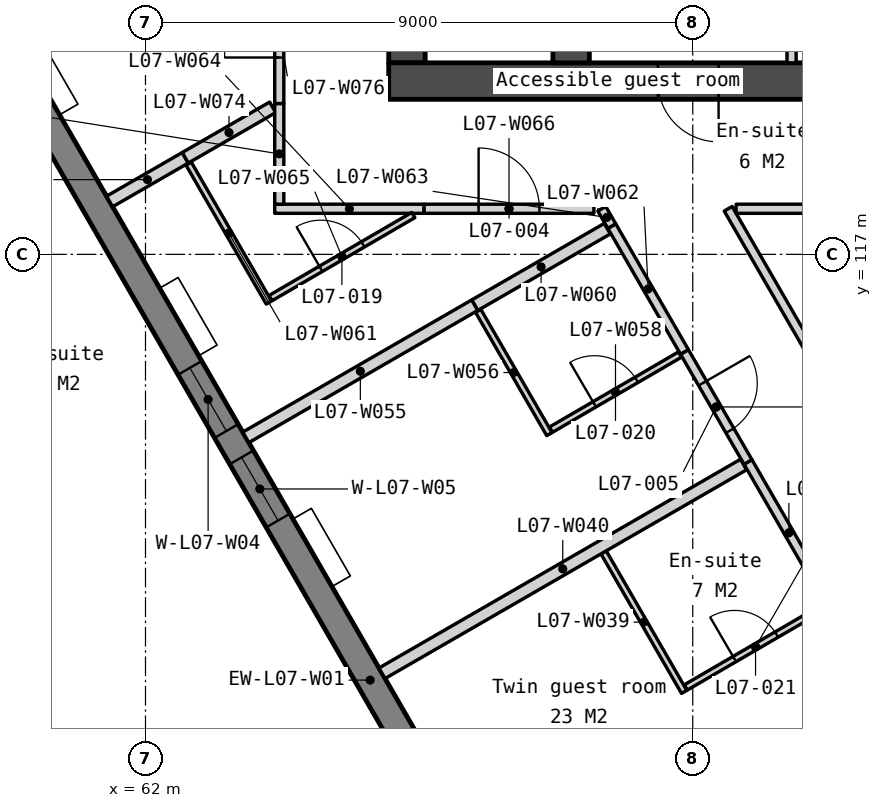
"""IFC4 building model, lengths in metres.
Left out: names, types, materials, properties, quantities, classifications, styles, units other than length and angle.
Written with IfcOpenShell. Run it as: python <this file> out.ifc"""

import sys

from ifc_helpers import new_model, si_unit, direction, frame, frame_2d, origin, place, context, subcontext, project, spatial, polyline, rectangle, outline, extrude, element, fill, save


model = new_model("IFC4")
c1 = context("Model", 3, precision=1e-05, world=origin(), true_north=direction((0.0, 1.0)))
c2 = subcontext(c1, "Body", "Model", "MODEL_VIEW")
j1 = project(units=[si_unit("LENGTHUNIT", "METRE"), si_unit("PLANEANGLEUNIT", "RADIAN")], contexts=[c1])
p1 = place(None, origin())
s1 = spatial("IfcSite", under=j1, at=p1, CompositionType="ELEMENT")
p2 = place(p1, origin())
s2 = spatial("IfcBuilding", under=s1, at=p2, CompositionType="ELEMENT")
p3 = place(p2, frame((0.0, 0.0, 38.5)))
s3 = spatial("IfcBuildingStorey", under=s2, at=p3, CompositionType="ELEMENT", Elevation=38.5)
p4 = place(p3, frame((66.3, 133.95, 0.0), z_axis=(0.0, 0.0, 1.0), x_axis=(0.0, -1.0, 0.0)))
e1 = element("IfcWall", 1, at=p4, inside=s3, PredefinedType="SOLIDWALL", context=c2, shape_type="SweptSolid", body=[
    extrude(rectangle(XDim=13.8, YDim=0.6, at=frame_2d((6.9, 0.0))), origin(), (0.0, 0.0, 1.0), 3.35),
])
p5 = place(p4, frame((0.6, 0.0, 0.0)))
e2 = element("IfcOpeningElement", 2, at=p5, cuts=e1, PredefinedType="OPENING", context=c2, shape_type="SweptSolid", body=[
    extrude(rectangle(XDim=1.1, YDim=2.1, at=frame_2d((0.55, 1.05))), frame((0.0, 0.31, 0.0), z_axis=(0.0, -1.0, 0.0), x_axis=(1.0, 0.0, 0.0)), (0.0, 0.0, 1.0), 0.62),
])
p6 = place(p4, frame((8.963, 0.0, 0.0)))
e3 = element("IfcOpeningElement", 3, at=p6, cuts=e1, PredefinedType="OPENING", context=c2, shape_type="SweptSolid", body=[
    extrude(rectangle(XDim=1.0, YDim=2.1, at=frame_2d((0.5, 1.05))), frame((0.0, 0.31, 0.0), z_axis=(0.0, -1.0, 0.0), x_axis=(1.0, 0.0, 0.0)), (0.0, 0.0, 1.0), 0.62),
])
p7 = place(p4, frame((11.888, 0.0, 0.0)))
e4 = element("IfcOpeningElement", 4, at=p7, cuts=e1, PredefinedType="OPENING", context=c2, shape_type="SweptSolid", body=[
    extrude(rectangle(XDim=1.0, YDim=2.1, at=frame_2d((0.5, 1.05))), frame((0.0, 0.31, 0.0), z_axis=(0.0, -1.0, 0.0), x_axis=(1.0, 0.0, 0.0)), (0.0, 0.0, 1.0), 0.62),
])
p8 = place(p3, frame((66.0, 119.85, 0.0), z_axis=(0.0, 0.0, 1.0), x_axis=(1.0, 0.0, 0.0)))
e5 = element("IfcWall", 5, at=p8, inside=s3, PredefinedType="SOLIDWALL", context=c2, shape_type="SweptSolid", body=[
    extrude(rectangle(XDim=28.0, YDim=0.6, at=frame_2d((14.0, 0.0))), origin(), (0.0, 0.0, 1.0), 3.35),
])
p9 = place(p8, frame((6.825, 0.0, 0.0)))
e6 = element("IfcOpeningElement", 6, at=p9, cuts=e5, PredefinedType="OPENING", context=c2, shape_type="SweptSolid", body=[
    extrude(rectangle(XDim=1.8, YDim=2.1, at=frame_2d((0.9, 1.05))), frame((0.0, 0.31, 0.0), z_axis=(0.0, -1.0, 0.0), x_axis=(1.0, 0.0, 0.0)), (0.0, 0.0, 1.0), 0.62),
])
p10 = place(p8, frame((15.85, 0.0, 0.0)))
e7 = element("IfcOpeningElement", 7, at=p10, cuts=e5, PredefinedType="OPENING", context=c2, shape_type="SweptSolid", body=[
    extrude(rectangle(XDim=1.5, YDim=2.1, at=frame_2d((0.75, 1.05))), frame((0.0, 0.31, 0.0), z_axis=(0.0, -1.0, 0.0), x_axis=(1.0, 0.0, 0.0)), (0.0, 0.0, 1.0), 0.62),
])
p11 = place(p8, frame((19.375, 0.0, 0.0)))
e8 = element("IfcOpeningElement", 8, at=p11, cuts=e5, PredefinedType="OPENING", context=c2, shape_type="SweptSolid", body=[
    extrude(rectangle(XDim=1.8, YDim=2.1, at=frame_2d((0.9, 1.05))), frame((0.0, 0.31, 0.0), z_axis=(0.0, -1.0, 0.0), x_axis=(1.0, 0.0, 0.0)), (0.0, 0.0, 1.0), 0.62),
])
p12 = place(p8, frame((4.425, 0.0, 0.0)))
e9 = element("IfcOpeningElement", 9, at=p12, cuts=e5, PredefinedType="OPENING", context=c2, shape_type="SweptSolid", body=[
    extrude(rectangle(XDim=1.0, YDim=2.1, at=frame_2d((0.5, 1.05))), frame((0.0, 0.31, 0.0), z_axis=(0.0, -1.0, 0.0), x_axis=(1.0, 0.0, 0.0)), (0.0, 0.0, 1.0), 0.62),
])
p13 = place(p8, frame((9.783, 0.0, 0.0)))
e10 = element("IfcOpeningElement", 10, at=p13, cuts=e5, PredefinedType="OPENING", context=c2, shape_type="SweptSolid", body=[
    extrude(rectangle(XDim=1.0, YDim=2.1, at=frame_2d((0.5, 1.05))), frame((0.0, 0.31, 0.0), z_axis=(0.0, -1.0, 0.0), x_axis=(1.0, 0.0, 0.0)), (0.0, 0.0, 1.0), 0.62),
])
p14 = place(p8, frame((11.525, 0.0, 0.0)))
e11 = element("IfcOpeningElement", 11, at=p14, cuts=e5, PredefinedType="OPENING", context=c2, shape_type="SweptSolid", body=[
    extrude(rectangle(XDim=1.0, YDim=2.1, at=frame_2d((0.5, 1.05))), frame((0.0, 0.31, 0.0), z_axis=(0.0, -1.0, 0.0), x_axis=(1.0, 0.0, 0.0)), (0.0, 0.0, 1.0), 0.62),
])
p15 = place(p8, frame((13.658, 0.0, 0.0)))
e12 = element("IfcOpeningElement", 12, at=p15, cuts=e5, PredefinedType="OPENING", context=c2, shape_type="SweptSolid", body=[
    extrude(rectangle(XDim=1.0, YDim=2.1, at=frame_2d((0.5, 1.05))), frame((0.0, 0.31, 0.0), z_axis=(0.0, -1.0, 0.0), x_axis=(1.0, 0.0, 0.0)), (0.0, 0.0, 1.0), 0.62),
])
p16 = place(p8, frame((22.575, 0.0, 0.0)))
e13 = element("IfcOpeningElement", 13, at=p16, cuts=e5, PredefinedType="OPENING", context=c2, shape_type="SweptSolid", body=[
    extrude(rectangle(XDim=1.0, YDim=2.1, at=frame_2d((0.5, 1.05))), frame((0.0, 0.31, 0.0), z_axis=(0.0, -1.0, 0.0), x_axis=(1.0, 0.0, 0.0)), (0.0, 0.0, 1.0), 0.62),
])
p17 = place(p3, frame((69.0, 122.25, 0.0), z_axis=(0.0, 0.0, 1.0), x_axis=(0.0, -1.0, 0.0)))
e14 = element("IfcWall", 14, at=p17, inside=s3, PredefinedType="SOLIDWALL", context=c2, shape_type="SweptSolid", body=[
    extrude(rectangle(XDim=2.1, YDim=0.6, at=frame_2d((1.05, 0.0))), origin(), (0.0, 0.0, 1.0), 3.35),
])
p18 = place(p3, frame((72.625, 122.25, 0.0), z_axis=(0.0, 0.0, 1.0), x_axis=(0.0, -1.0, 0.0)))
e15 = element("IfcWall", 15, at=p18, inside=s3, PredefinedType="PARTITIONING", context=c2, shape_type="SweptSolid", body=[
    extrude(rectangle(XDim=2.1, YDim=0.15, at=frame_2d((1.05, 0.0))), origin(), (0.0, 0.0, 1.0), 3.35),
])
p19 = place(p3, frame((54.495, 129.397, -0.15), z_axis=(0.0, 0.0, 1.0), x_axis=(0.499999201451, -0.866025864826, 0.0)))
e16 = element("IfcWall", 16, at=p19, inside=s3, PredefinedType="SOLIDWALL", context=c2, shape_type="SweptSolid", body=[
    extrude(outline(polyline([(44.8, 0.0), (44.8, 3.5), (0.0, 3.5), (0.0, 0.0), (44.8, 0.0)])), frame((0.0, 0.225, 0.0), z_axis=(0.0, -1.0, 0.0), x_axis=(1.0, 0.0, 0.0)), (0.0, 0.0, 1.0), 0.45),
])
p20 = place(p19, frame((0.722, 0.0, 1.05)))
e17 = element("IfcOpeningElement", 17, at=p20, cuts=e16, PredefinedType="OPENING", context=c2, shape_type="SweptSolid", body=[
    extrude(rectangle(XDim=1.2, YDim=1.5, at=frame_2d((0.6, 0.75))), frame((0.0, 0.235, 0.0), z_axis=(0.0, -1.0, 0.0), x_axis=(1.0, 0.0, 0.0)), (0.0, 0.0, 1.0), 0.47),
])
p21 = place(p19, frame((7.51, 0.0, 1.05)))
e18 = element("IfcOpeningElement", 18, at=p21, cuts=e16, PredefinedType="OPENING", context=c2, shape_type="SweptSolid", body=[
    extrude(rectangle(XDim=1.2, YDim=1.5, at=frame_2d((0.6, 0.75))), frame((0.0, 0.235, 0.0), z_axis=(0.0, -1.0, 0.0), x_axis=(1.0, 0.0, 0.0)), (0.0, 0.0, 1.0), 0.47),
])
p22 = place(p19, frame((9.21, 0.0, 1.05)))
e19 = element("IfcOpeningElement", 19, at=p22, cuts=e16, PredefinedType="OPENING", context=c2, shape_type="SweptSolid", body=[
    extrude(rectangle(XDim=1.2, YDim=1.5, at=frame_2d((0.6, 0.75))), frame((0.0, 0.235, 0.0), z_axis=(0.0, -1.0, 0.0), x_axis=(1.0, 0.0, 0.0)), (0.0, 0.0, 1.0), 0.47),
])
p23 = place(p19, frame((16.47, 0.0, 1.05)))
e20 = element("IfcOpeningElement", 20, at=p23, cuts=e16, PredefinedType="OPENING", context=c2, shape_type="SweptSolid", body=[
    extrude(rectangle(XDim=1.2, YDim=1.5, at=frame_2d((0.6, 0.75))), frame((0.0, 0.235, 0.0), z_axis=(0.0, -1.0, 0.0), x_axis=(1.0, 0.0, 0.0)), (0.0, 0.0, 1.0), 0.47),
])
p24 = place(p19, frame((18.17, 0.0, 1.05)))
e21 = element("IfcOpeningElement", 21, at=p24, cuts=e16, PredefinedType="OPENING", context=c2, shape_type="SweptSolid", body=[
    extrude(rectangle(XDim=1.2, YDim=1.5, at=frame_2d((0.6, 0.75))), frame((0.0, 0.235, 0.0), z_axis=(0.0, -1.0, 0.0), x_axis=(1.0, 0.0, 0.0)), (0.0, 0.0, 1.0), 0.47),
])
p25 = place(p19, frame((25.43, 0.0, 1.05)))
e22 = element("IfcOpeningElement", 22, at=p25, cuts=e16, PredefinedType="OPENING", context=c2, shape_type="SweptSolid", body=[
    extrude(rectangle(XDim=1.2, YDim=1.5, at=frame_2d((0.6, 0.75))), frame((0.0, 0.235, 0.0), z_axis=(0.0, -1.0, 0.0), x_axis=(1.0, 0.0, 0.0)), (0.0, 0.0, 1.0), 0.47),
])
p26 = place(p19, frame((27.13, 0.0, 1.05)))
e23 = element("IfcOpeningElement", 23, at=p26, cuts=e16, PredefinedType="OPENING", context=c2, shape_type="SweptSolid", body=[
    extrude(rectangle(XDim=1.2, YDim=1.5, at=frame_2d((0.6, 0.75))), frame((0.0, 0.235, 0.0), z_axis=(0.0, -1.0, 0.0), x_axis=(1.0, 0.0, 0.0)), (0.0, 0.0, 1.0), 0.47),
])
p27 = place(p19, frame((34.39, 0.0, 1.05)))
e24 = element("IfcOpeningElement", 24, at=p27, cuts=e16, PredefinedType="OPENING", context=c2, shape_type="SweptSolid", body=[
    extrude(rectangle(XDim=1.2, YDim=1.5, at=frame_2d((0.6, 0.75))), frame((0.0, 0.235, 0.0), z_axis=(0.0, -1.0, 0.0), x_axis=(1.0, 0.0, 0.0)), (0.0, 0.0, 1.0), 0.47),
])
p28 = place(p19, frame((36.09, 0.0, 1.05)))
e25 = element("IfcOpeningElement", 25, at=p28, cuts=e16, PredefinedType="OPENING", context=c2, shape_type="SweptSolid", body=[
    extrude(rectangle(XDim=1.2, YDim=1.5, at=frame_2d((0.6, 0.75))), frame((0.0, 0.235, 0.0), z_axis=(0.0, -1.0, 0.0), x_axis=(1.0, 0.0, 0.0)), (0.0, 0.0, 1.0), 0.47),
])
p29 = place(p19, frame((42.878, 0.0, 1.05)))
e26 = element("IfcOpeningElement", 26, at=p29, cuts=e16, PredefinedType="OPENING", context=c2, shape_type="SweptSolid", body=[
    extrude(rectangle(XDim=1.2, YDim=1.5, at=frame_2d((0.6, 0.75))), frame((0.0, 0.235, 0.0), z_axis=(0.0, -1.0, 0.0), x_axis=(1.0, 0.0, 0.0)), (0.0, 0.0, 1.0), 0.47),
])
p30 = place(p3, frame((71.583, 117.75, 0.0), z_axis=(0.0, 0.0, 1.0), x_axis=(0.500001770766, -0.86602438143, 0.0)))
e27 = element("IfcWall", 27, at=p30, inside=s3, PredefinedType="PARTITIONING", context=c2, shape_type="SweptSolid", body=[
    extrude(rectangle(XDim=13.745, YDim=0.15, at=frame_2d((6.873, 0.0))), origin(), (0.0, 0.0, 1.0), 3.35),
])
p31 = place(p30, frame((6.422, 0.0, 0.0)))
e28 = element("IfcOpeningElement", 28, at=p31, cuts=e27, PredefinedType="OPENING", context=c2, shape_type="SweptSolid", body=[
    extrude(rectangle(XDim=0.9, YDim=2.1, at=frame_2d((0.45, 1.05))), frame((0.0, 0.085, 0.0), z_axis=(0.0, -1.0, 0.0), x_axis=(1.0, 0.0, 0.0)), (0.0, 0.0, 1.0), 0.17),
])
p32 = place(p3, frame((69.534, 112.099, 0.0), z_axis=(0.0, 0.0, 1.0), x_axis=(0.499993606316, -0.866029095148, 0.0)))
e29 = element("IfcWall", 29, at=p32, inside=s3, PredefinedType="PARTITIONING", context=c2, shape_type="SweptSolid", body=[
    extrude(rectangle(XDim=2.65, YDim=0.1, at=frame_2d((1.325, 0.0))), origin(), (0.0, 0.0, 1.0), 3.35),
])
p33 = place(p3, frame((65.89, 110.11, 0.0), z_axis=(0.0, 0.0, 1.0), x_axis=(0.86603516302, 0.499983096127, 0.0)))
e30 = element("IfcWall", 30, at=p33, inside=s3, PredefinedType="PARTITIONING", context=c2, shape_type="SweptSolid", body=[
    extrude(rectangle(XDim=6.865, YDim=0.2, at=frame_2d((3.433, 0.0))), origin(), (0.0, 0.0, 1.0), 3.35),
])
p34 = place(p3, frame((70.885, 109.877, 0.0), z_axis=(0.0, 0.0, 1.0), x_axis=(0.864248761918, 0.503064685228, 0.0)))
e31 = element("IfcWall", 31, at=p34, inside=s3, PredefinedType="PARTITIONING", context=c2, shape_type="SweptSolid", body=[
    extrude(rectangle(XDim=2.655, YDim=0.1, at=frame_2d((1.328, 0.0))), origin(), (0.0, 0.0, 1.0), 3.35),
])
p35 = place(p34, frame((0.927, 0.0, 0.0)))
e32 = element("IfcOpeningElement", 32, at=p35, cuts=e31, PredefinedType="OPENING", context=c2, shape_type="SweptSolid", body=[
    extrude(rectangle(XDim=0.8, YDim=2.1, at=frame_2d((0.4, 1.05))), frame((0.0, 0.06, 0.0), z_axis=(0.0, -1.0, 0.0), x_axis=(1.0, 0.0, 0.0)), (0.0, 0.0, 1.0), 0.12),
])
p36 = place(p3, frame((71.909, 113.585, 0.0), z_axis=(0.0, 0.0, 1.0), x_axis=(0.499994808408, -0.866028401131, 0.0)))
e33 = element("IfcWall", 33, at=p36, inside=s3, PredefinedType="PARTITIONING", context=c2, shape_type="SweptSolid", body=[
    extrude(rectangle(XDim=2.69, YDim=0.15, at=frame_2d((1.345, 0.0))), origin(), (0.0, 0.0, 1.0), 3.35),
])
p37 = place(p3, frame((70.864, 115.395, 0.0), z_axis=(0.0, 0.0, 1.0), x_axis=(0.500046000743, -0.865998843614, 0.0)))
e34 = element("IfcWall", 34, at=p37, inside=s3, PredefinedType="PARTITIONING", context=c2, shape_type="SweptSolid", body=[
    extrude(rectangle(XDim=2.09, YDim=0.15, at=frame_2d((1.045, 0.0))), origin(), (0.0, 0.0, 1.0), 3.35),
])
p38 = place(p37, frame((0.595, 0.0, 0.0)))
e35 = element("IfcOpeningElement", 35, at=p38, cuts=e34, PredefinedType="OPENING", context=c2, shape_type="SweptSolid", body=[
    extrude(rectangle(XDim=0.9, YDim=2.1, at=frame_2d((0.45, 1.05))), frame((0.0, 0.085, 0.0), z_axis=(0.0, -1.0, 0.0), x_axis=(1.0, 0.0, 0.0)), (0.0, 0.0, 1.0), 0.17),
])
p39 = place(p3, frame((63.65, 113.99, 0.0), z_axis=(0.0, 0.0, 1.0), x_axis=(0.866027639635, 0.499996127374, 0.0)))
e36 = element("IfcWall", 36, at=p39, inside=s3, PredefinedType="PARTITIONING", context=c2, shape_type="SweptSolid", body=[
    extrude(rectangle(XDim=4.35, YDim=0.2, at=frame_2d((2.175, 0.0))), origin(), (0.0, 0.0, 1.0), 3.35),
])
p40 = place(p3, frame((67.472, 116.07, 0.0), z_axis=(0.0, 0.0, 1.0), x_axis=(0.499954256575, -0.866051812152, 0.0)))
e37 = element("IfcWall", 37, at=p40, inside=s3, PredefinedType="PARTITIONING", context=c2, shape_type="SweptSolid", body=[
    extrude(rectangle(XDim=2.34, YDim=0.1, at=frame_2d((1.17, 0.0))), origin(), (0.0, 0.0, 1.0), 3.35),
])
p41 = place(p3, frame((68.669, 114.117, 0.0), z_axis=(0.0, 0.0, 1.0), x_axis=(0.864063696467, 0.503382487227, 0.0)))
e38 = element("IfcWall", 38, at=p41, inside=s3, PredefinedType="PARTITIONING", context=c2, shape_type="SweptSolid", body=[
    extrude(rectangle(XDim=2.455, YDim=0.1, at=frame_2d((1.228, 0.0))), origin(), (0.0, 0.0, 1.0), 3.35),
])
p42 = place(p41, frame((0.827, 0.0, 0.0)))
e39 = element("IfcOpeningElement", 39, at=p42, cuts=e38, PredefinedType="OPENING", context=c2, shape_type="SweptSolid", body=[
    extrude(rectangle(XDim=0.8, YDim=2.1, at=frame_2d((0.4, 1.05))), frame((0.0, 0.06, 0.0), z_axis=(0.0, -1.0, 0.0), x_axis=(1.0, 0.0, 0.0)), (0.0, 0.0, 1.0), 0.12),
])
p43 = place(p3, frame((67.417, 116.165, 0.0), z_axis=(0.0, 0.0, 1.0), x_axis=(0.866006140796, 0.500033362991, 0.0)))
e40 = element("IfcWall", 40, at=p43, inside=s3, PredefinedType="PARTITIONING", context=c2, shape_type="SweptSolid", body=[
    extrude(rectangle(XDim=2.515, YDim=0.2, at=frame_2d((1.257, 0.0))), origin(), (0.0, 0.0, 1.0), 3.35),
])
p44 = place(p3, frame((62.709, 118.493, 0.0), z_axis=(0.0, 0.0, 1.0), x_axis=(0.500048002682, -0.865997687649, 0.0)))
e41 = element("IfcWall", 41, at=p44, inside=s3, PredefinedType="PARTITIONING", context=c2, shape_type="SweptSolid", body=[
    extrude(rectangle(XDim=2.64, YDim=0.1, at=frame_2d((1.32, 0.0))), origin(), (0.0, 0.0, 1.0), 3.35),
])
p45 = place(p3, frame((69.669, 117.465, 0.0), z_axis=(0.0, 0.0, 1.0), x_axis=(0.499940577336, -0.866059708757, 0.0)))
e42 = element("IfcWall", 42, at=p45, inside=s3, PredefinedType="PARTITIONING", context=c2, shape_type="SweptSolid", body=[
    extrude(rectangle(XDim=2.39, YDim=0.15, at=frame_2d((1.195, 0.0))), origin(), (0.0, 0.0, 1.0), 3.35),
])
p46 = place(p3, frame((69.504, 117.75, 0.0), z_axis=(0.0, 0.0, 1.0), x_axis=(0.500129239174, -0.865950774653, 0.0)))
e43 = element("IfcWall", 43, at=p46, inside=s3, PredefinedType="PARTITIONING", context=c2, shape_type="SweptSolid", body=[
    extrude(rectangle(XDim=0.329, YDim=0.15, at=frame_2d((0.165, 0.0))), origin(), (0.0, 0.0, 1.0), 3.35),
])
p47 = place(p3, frame((64.125, 117.75, 0.0), z_axis=(0.0, 0.0, 1.0), x_axis=(1.0, 0.0, 0.0)))
e44 = element("IfcWall", 44, at=p47, inside=s3, PredefinedType="PARTITIONING", context=c2, shape_type="SweptSolid", body=[
    extrude(rectangle(XDim=2.457, YDim=0.15, at=frame_2d((1.229, 0.0))), origin(), (0.0, 0.0, 1.0), 3.35),
])
p48 = place(p3, frame((64.056, 116.28, 0.0), z_axis=(0.0, 0.0, 1.0), x_axis=(0.864358276906, 0.50287649492, 0.0)))
e45 = element("IfcWall", 45, at=p48, inside=s3, PredefinedType="PARTITIONING", context=c2, shape_type="SweptSolid", body=[
    extrude(rectangle(XDim=2.718, YDim=0.1, at=frame_2d((1.359, 0.0))), origin(), (0.0, 0.0, 1.0), 3.35),
])
p49 = place(p48, frame((0.959, 0.0, 0.0)))
e46 = element("IfcOpeningElement", 46, at=p49, cuts=e45, PredefinedType="OPENING", context=c2, shape_type="SweptSolid", body=[
    extrude(rectangle(XDim=0.8, YDim=2.1, at=frame_2d((0.4, 1.05))), frame((0.0, 0.06, 0.0), z_axis=(0.0, -1.0, 0.0), x_axis=(1.0, 0.0, 0.0)), (0.0, 0.0, 1.0), 0.12),
])
p50 = place(p3, frame((66.582, 117.75, 0.0), z_axis=(0.0, 0.0, 1.0), x_axis=(1.0, 0.0, 0.0)))
e47 = element("IfcWall", 47, at=p50, inside=s3, PredefinedType="PARTITIONING", context=c2, shape_type="SweptSolid", body=[
    extrude(rectangle(XDim=2.792, YDim=0.15, at=frame_2d((1.396, 0.0))), origin(), (0.0, 0.0, 1.0), 3.35),
])
p51 = place(p50, frame((0.896, 0.0, 0.0)))
e48 = element("IfcOpeningElement", 48, at=p51, cuts=e47, PredefinedType="OPENING", context=c2, shape_type="SweptSolid", body=[
    extrude(rectangle(XDim=1.0, YDim=2.1, at=frame_2d((0.5, 1.05))), frame((0.0, 0.085, 0.0), z_axis=(0.0, -1.0, 0.0), x_axis=(1.0, 0.0, 0.0)), (0.0, 0.0, 1.0), 0.17),
])
p52 = place(p3, frame((71.712, 117.75, 0.0), z_axis=(0.0, 0.0, 1.0), x_axis=(1.0, 0.0, 0.0)))
e49 = element("IfcWall", 49, at=p52, inside=s3, PredefinedType="PARTITIONING", context=c2, shape_type="SweptSolid", body=[
    extrude(rectangle(XDim=6.743, YDim=0.15, at=frame_2d((3.371, 0.0))), origin(), (0.0, 0.0, 1.0), 3.35),
])
p53 = place(p3, frame((61.41, 117.87, 0.0), z_axis=(0.0, 0.0, 1.0), x_axis=(0.866007328409, 0.500031306162, 0.0)))
e50 = element("IfcWall", 50, at=p53, inside=s3, PredefinedType="PARTITIONING", context=c2, shape_type="SweptSolid", body=[
    extrude(rectangle(XDim=1.437, YDim=0.2, at=frame_2d((0.719, 0.0))), origin(), (0.0, 0.0, 1.0), 3.35),
])
p54 = place(p3, frame((62.654, 118.588, 0.0), z_axis=(0.0, 0.0, 1.0), x_axis=(0.866090081402, 0.499887958344, 0.0)))
e51 = element("IfcWall", 51, at=p54, inside=s3, PredefinedType="PARTITIONING", context=c2, shape_type="SweptSolid", body=[
    extrude(rectangle(XDim=1.66, YDim=0.2, at=frame_2d((0.83, 0.0))), origin(), (0.0, 0.0, 1.0), 3.35),
])
p55 = place(p3, frame((64.2, 117.825, 0.0), z_axis=(0.0, 0.0, 1.0), x_axis=(0.0, 1.0, 0.0)))
e52 = element("IfcWall", 52, at=p55, inside=s3, PredefinedType="PARTITIONING", context=c2, shape_type="SweptSolid", body=[
    extrude(rectangle(XDim=1.656, YDim=0.15, at=frame_2d((0.828, 0.0))), origin(), (0.0, 0.0, 1.0), 3.35),
])
p56 = place(p3, frame((64.2, 119.481, 0.0), z_axis=(0.0, 0.0, 1.0), x_axis=(0.0, 1.0, 0.0)))
e53 = element("IfcWall", 53, at=p56, inside=s3, PredefinedType="PARTITIONING", context=c2, shape_type="SweptSolid", body=[
    extrude(rectangle(XDim=2.413, YDim=0.15, at=frame_2d((1.207, 0.0))), origin(), (0.0, 0.0, 1.0), 3.35),
])
p57 = place(p56, frame((0.757, 0.0, 0.0)))
e54 = element("IfcOpeningElement", 54, at=p57, cuts=e53, PredefinedType="OPENING", context=c2, shape_type="SweptSolid", body=[
    extrude(rectangle(XDim=0.9, YDim=2.1, at=frame_2d((0.45, 1.05))), frame((0.0, 0.085, 0.0), z_axis=(0.0, -1.0, 0.0), x_axis=(1.0, 0.0, 0.0)), (0.0, 0.0, 1.0), 0.17),
])
p58 = place(p12, origin())
e55 = element("IfcDoor", 55, at=p58, inside=s3, OperationType="SINGLE_SWING_RIGHT", PredefinedType="DOOR", context=c2, shape_type="SweptSolid", body=[
    extrude(rectangle(XDim=1.0, YDim=2.1, at=frame_2d((0.5, 1.05))), frame((0.0, 0.025, 0.0), z_axis=(0.0, -1.0, 0.0), x_axis=(1.0, 0.0, 0.0)), (0.0, 0.0, 1.0), 0.05),
])
fill(e9, e55)
p59 = place(p23, origin())
e56 = element("IfcWindow", 56, at=p59, inside=s3, PartitioningType="SINGLE_PANEL", PredefinedType="WINDOW", context=c2, shape_type="SweptSolid", body=[
    extrude(rectangle(XDim=1.2, YDim=1.5, at=frame_2d((0.6, 0.75))), frame((0.0, 0.03, 0.0), z_axis=(0.0, -1.0, 0.0), x_axis=(1.0, 0.0, 0.0)), (0.0, 0.0, 1.0), 0.06),
])
fill(e20, e56)
p60 = place(p24, origin())
e57 = element("IfcWindow", 57, at=p60, inside=s3, PartitioningType="SINGLE_PANEL", PredefinedType="WINDOW", context=c2, shape_type="SweptSolid", body=[
    extrude(rectangle(XDim=1.2, YDim=1.5, at=frame_2d((0.6, 0.75))), frame((0.0, 0.03, 0.0), z_axis=(0.0, -1.0, 0.0), x_axis=(1.0, 0.0, 0.0)), (0.0, 0.0, 1.0), 0.06),
])
fill(e21, e57)
p61 = place(p57, origin())
e58 = element("IfcDoor", 58, at=p61, inside=s3, OperationType="SINGLE_SWING_LEFT", PredefinedType="DOOR", context=c2, shape_type="SweptSolid", body=[
    extrude(rectangle(XDim=0.9, YDim=2.1, at=frame_2d((0.45, 1.05))), frame((0.0, 0.025, 0.0), z_axis=(0.0, -1.0, 0.0), x_axis=(1.0, 0.0, 0.0)), (0.0, 0.0, 1.0), 0.05),
])
fill(e54, e58)
p62 = place(p51, origin())
e59 = element("IfcDoor", 59, at=p62, inside=s3, OperationType="SINGLE_SWING_LEFT", PredefinedType="DOOR", context=c2, shape_type="SweptSolid", body=[
    extrude(rectangle(XDim=1.0, YDim=2.1, at=frame_2d((0.5, 1.05))), frame((0.0, 0.025, 0.0), z_axis=(0.0, -1.0, 0.0), x_axis=(1.0, 0.0, 0.0)), (0.0, 0.0, 1.0), 0.05),
])
fill(e48, e59)
p63 = place(p38, origin())
e60 = element("IfcDoor", 60, at=p63, inside=s3, OperationType="SINGLE_SWING_LEFT", PredefinedType="DOOR", context=c2, shape_type="SweptSolid", body=[
    extrude(rectangle(XDim=0.9, YDim=2.1, at=frame_2d((0.45, 1.05))), frame((0.0, 0.025, 0.0), z_axis=(0.0, -1.0, 0.0), x_axis=(1.0, 0.0, 0.0)), (0.0, 0.0, 1.0), 0.05),
])
fill(e35, e60)
p64 = place(p49, origin())
e61 = element("IfcDoor", 61, at=p64, inside=s3, OperationType="SINGLE_SWING_LEFT", PredefinedType="DOOR", context=c2, shape_type="SweptSolid", body=[
    extrude(rectangle(XDim=0.8, YDim=2.1, at=frame_2d((0.4, 1.05))), frame((0.0, 0.025, 0.0), z_axis=(0.0, -1.0, 0.0), x_axis=(1.0, 0.0, 0.0)), (0.0, 0.0, 1.0), 0.05),
])
fill(e46, e61)
p65 = place(p42, origin())
e62 = element("IfcDoor", 62, at=p65, inside=s3, OperationType="SINGLE_SWING_LEFT", PredefinedType="DOOR", context=c2, shape_type="SweptSolid", body=[
    extrude(rectangle(XDim=0.8, YDim=2.1, at=frame_2d((0.4, 1.05))), frame((0.0, 0.025, 0.0), z_axis=(0.0, -1.0, 0.0), x_axis=(1.0, 0.0, 0.0)), (0.0, 0.0, 1.0), 0.05),
])
fill(e39, e62)
p66 = place(p35, origin())
e63 = element("IfcDoor", 63, at=p66, inside=s3, OperationType="SINGLE_SWING_LEFT", PredefinedType="DOOR", context=c2, shape_type="SweptSolid", body=[
    extrude(rectangle(XDim=0.8, YDim=2.1, at=frame_2d((0.4, 1.05))), frame((0.0, 0.025, 0.0), z_axis=(0.0, -1.0, 0.0), x_axis=(1.0, 0.0, 0.0)), (0.0, 0.0, 1.0), 0.05),
])
fill(e32, e63)
save(model, sys.argv[1])
